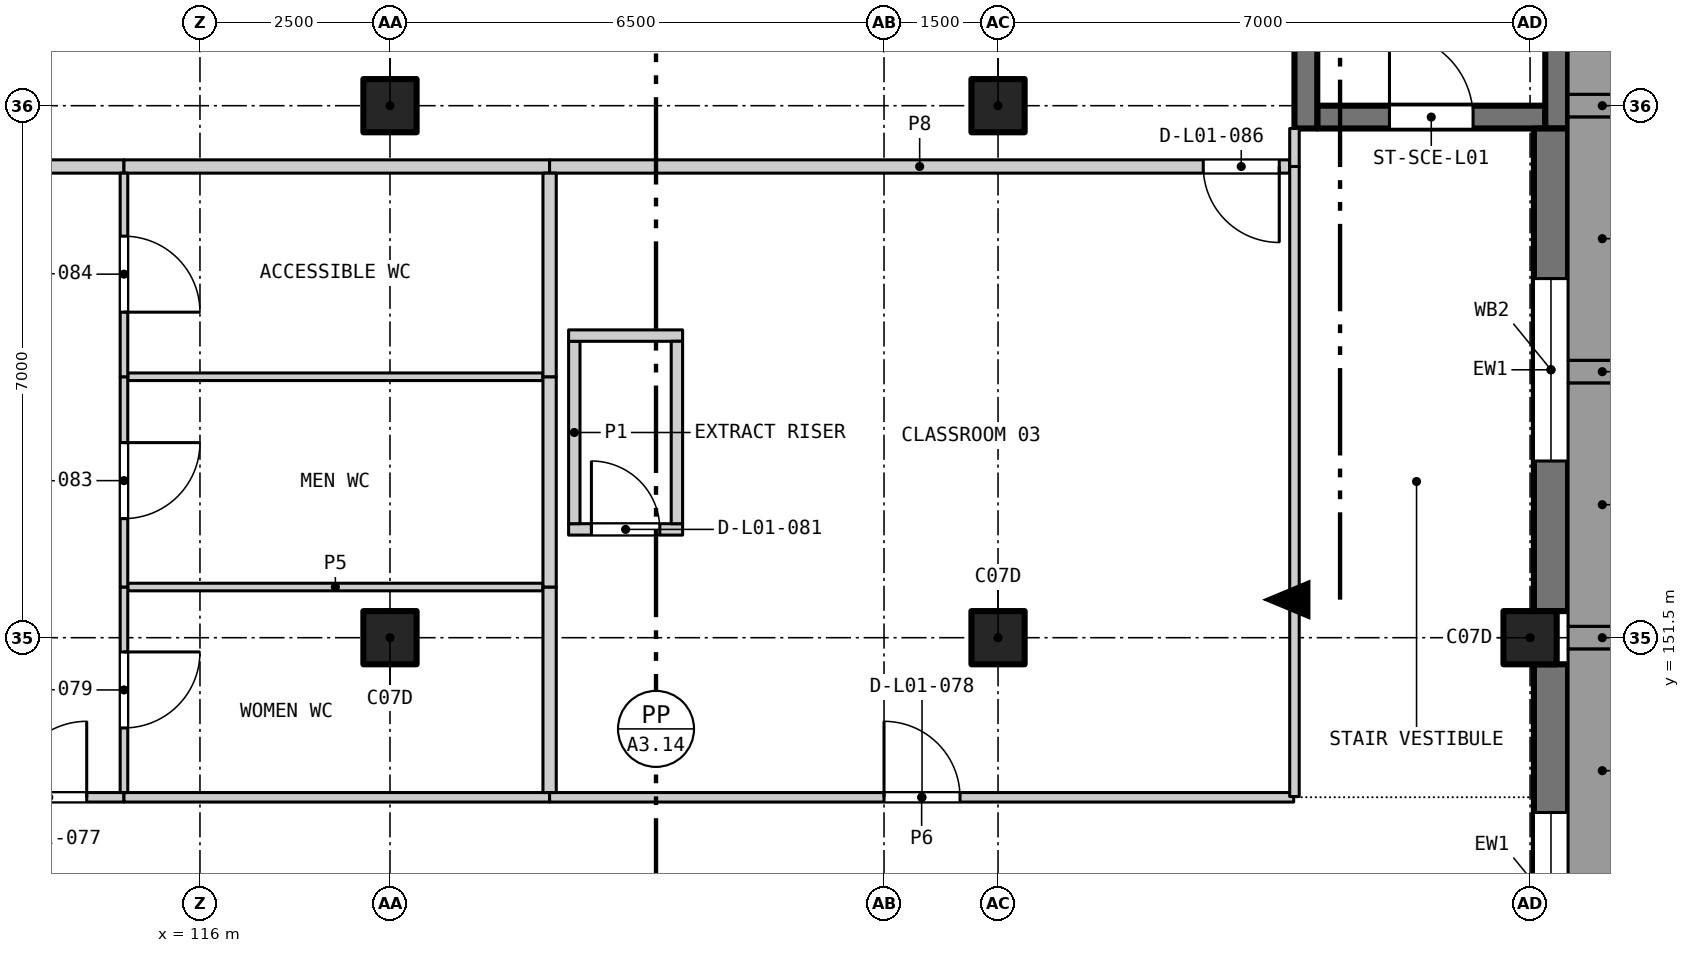
"""IFC4 building model, lengths in metres.
Left out: names, types, materials, properties, quantities, classifications, styles, units other than length and angle.
Written with IfcOpenShell. Run it as: python <this file> out.ifc"""

import sys

from ifc_helpers import new_model, si_unit, direction, frame, frame_2d, origin, origin_2d, place, context, subcontext, project, spatial, rectangle, extrude, element, fill, save


model = new_model("IFC4")
c1 = context("Model", 3, precision=1e-05, world=origin(), true_north=direction((0.0, 1.0)))
c2 = subcontext(c1, "Body", "Model", "MODEL_VIEW")
j1 = project(units=[si_unit("LENGTHUNIT", "METRE"), si_unit("PLANEANGLEUNIT", "RADIAN")], contexts=[c1])
p1 = place(None, origin())
s1 = spatial("IfcSite", under=j1, at=p1, CompositionType="ELEMENT")
p2 = place(p1, origin())
s2 = spatial("IfcBuilding", under=s1, at=p2, CompositionType="ELEMENT")
p3 = place(p2, frame((0.0, 0.0, 6.0)))
s3 = spatial("IfcBuildingStorey", under=s2, at=p3, CompositionType="ELEMENT", Elevation=6.0)
for number, where, z_axis, x_axis in (
    (1, (118.5, 151.5, 0.0), (0.0, 0.0, 1.0), (1.0, 0.0, 0.0)),
    (2, (118.5, 158.5, 0.0), (0.0, 0.0, 1.0), (1.0, 0.0, 0.0)),
    (3, (126.5, 151.5, 0.0), (0.0, 0.0, 1.0), (1.0, 0.0, 0.0)),
    (4, (126.5, 158.5, 0.0), (0.0, 0.0, 1.0), (1.0, 0.0, 0.0)),
    (5, (133.5, 151.5, 0.0), (0.0, 0.0, 1.0), (1.0, 0.0, 0.0)),
):
    element("IfcColumn", number, at=place(p3, frame(where, z_axis=z_axis, x_axis=x_axis)), inside=s3, PredefinedType="COLUMN", context=c2, shape_type="SweptSolid", body=[
        extrude(rectangle(XDim=0.7, YDim=0.7, at=origin_2d()), origin(), (0.0, 0.0, 1.0), 4.2),
    ])
p4 = place(p3, frame((130.7, 158.35, 0.0), z_axis=(0.0, 0.0, 1.0), x_axis=(1.0, 0.0, 0.0)))
e6 = element("IfcWall", 6, at=p4, inside=s3, PredefinedType="SHEAR", context=c2, shape_type="SweptSolid", body=[
    extrude(rectangle(XDim=3.0, YDim=0.3, at=frame_2d((1.5, 0.0))), origin(), (0.0, 0.0, 1.0), 4.2),
])
p5 = place(p4, frame((0.95, 0.0, 0.0)))
e7 = element("IfcOpeningElement", 7, at=p5, cuts=e6, PredefinedType="OPENING", context=c2, shape_type="SweptSolid", body=[
    extrude(rectangle(XDim=1.1, YDim=2.1, at=frame_2d((0.55, 1.05))), frame((0.0, 0.16, 0.0), z_axis=(0.0, -1.0, 0.0), x_axis=(1.0, 0.0, 0.0)), (0.0, 0.0, 1.0), 0.32),
])
p6 = place(p3, frame((130.55, 158.2, 0.0), z_axis=(0.0, 0.0, 1.0), x_axis=(0.0, 1.0, 0.0)))
e8 = element("IfcWall", 8, at=p6, inside=s3, PredefinedType="SHEAR", context=c2, shape_type="SweptSolid", body=[
    extrude(rectangle(XDim=7.5, YDim=0.3, at=frame_2d((3.75, 0.0))), origin(), (0.0, 0.0, 1.0), 4.2),
])
p7 = place(p3, frame((133.85, 165.7, 0.0), z_axis=(0.0, 0.0, 1.0), x_axis=(0.0, -1.0, 0.0)))
e9 = element("IfcWall", 9, at=p7, inside=s3, PredefinedType="SOLIDWALL", context=c2, shape_type="SweptSolid", body=[
    extrude(rectangle(XDim=7.5, YDim=0.3, at=frame_2d((3.75, 0.0))), origin(), (0.0, 0.0, 1.0), 3.9),
])
p8 = place(p3, frame((133.775, 151.15, 0.0), z_axis=(0.0, 0.0, 1.0), x_axis=(0.0, -1.0, 0.0)))
e10 = element("IfcWall", 10, at=p8, inside=s3, PredefinedType="SOLIDWALL", context=c2, shape_type="SweptSolid", body=[
    extrude(rectangle(XDim=6.3, YDim=0.45, at=frame_2d((3.15, 0.0))), origin(), (0.0, 0.0, 1.0), 3.2),
])
p9 = place(p8, frame((1.95, 0.0, 0.9)))
e11 = element("IfcOpeningElement", 11, at=p9, cuts=e10, PredefinedType="OPENING", context=c2, shape_type="SweptSolid", body=[
    extrude(rectangle(XDim=2.4, YDim=1.6, at=frame_2d((1.2, 0.8))), frame((0.0, 0.235, 0.0), z_axis=(0.0, -1.0, 0.0), x_axis=(1.0, 0.0, 0.0)), (0.0, 0.0, 1.0), 0.47),
])
p10 = place(p3, frame((133.775, 158.2, 0.0), z_axis=(0.0, 0.0, 1.0), x_axis=(0.0, -1.0, 0.0)))
e12 = element("IfcWall", 12, at=p10, inside=s3, PredefinedType="SOLIDWALL", context=c2, shape_type="SweptSolid", body=[
    extrude(rectangle(XDim=6.35, YDim=0.45, at=frame_2d((3.175, 0.0))), origin(), (0.0, 0.0, 1.0), 3.2),
])
p11 = place(p10, frame((1.975, 0.0, 0.9)))
e13 = element("IfcOpeningElement", 13, at=p11, cuts=e12, PredefinedType="OPENING", context=c2, shape_type="SweptSolid", body=[
    extrude(rectangle(XDim=2.4, YDim=1.6, at=frame_2d((1.2, 0.8))), frame((0.0, 0.235, 0.0), z_axis=(0.0, -1.0, 0.0), x_axis=(1.0, 0.0, 0.0)), (0.0, 0.0, 1.0), 0.47),
])
p12 = place(p3, frame((120.85, 152.925, 0.0), z_axis=(0.0, 0.0, 1.0), x_axis=(1.0, 0.0, 0.0)))
e14 = element("IfcWall", 14, at=p12, inside=s3, PredefinedType="PARTITIONING", context=c2, shape_type="SweptSolid", body=[
    extrude(rectangle(XDim=1.5, YDim=0.15, at=frame_2d((0.75, 0.0))), origin(), (0.0, 0.0, 1.0), 3.9),
])
p13 = place(p12, frame((0.3, 0.0, 0.0)))
e15 = element("IfcOpeningElement", 15, at=p13, cuts=e14, PredefinedType="OPENING", context=c2, shape_type="SweptSolid", body=[
    extrude(rectangle(XDim=0.9, YDim=2.1, at=frame_2d((0.45, 1.05))), frame((0.0, 0.085, 0.0), z_axis=(0.0, -1.0, 0.0), x_axis=(1.0, 0.0, 0.0)), (0.0, 0.0, 1.0), 0.17),
])
p14 = place(p3, frame((120.925, 153.0, 0.0), z_axis=(0.0, 0.0, 1.0), x_axis=(0.0, 1.0, 0.0)))
e16 = element("IfcWall", 16, at=p14, inside=s3, PredefinedType="PARTITIONING", context=c2, shape_type="SweptSolid", body=[
    extrude(rectangle(XDim=2.4, YDim=0.15, at=frame_2d((1.2, 0.0))), origin(), (0.0, 0.0, 1.0), 3.9),
])
p15 = place(p3, frame((120.85, 155.475, 0.0), z_axis=(0.0, 0.0, 1.0), x_axis=(1.0, 0.0, 0.0)))
e17 = element("IfcWall", 17, at=p15, inside=s3, PredefinedType="PARTITIONING", context=c2, shape_type="SweptSolid", body=[
    extrude(rectangle(XDim=1.5, YDim=0.15, at=frame_2d((0.75, 0.0))), origin(), (0.0, 0.0, 1.0), 3.9),
])
p16 = place(p3, frame((122.275, 153.0, 0.0), z_axis=(0.0, 0.0, 1.0), x_axis=(0.0, 1.0, 0.0)))
e18 = element("IfcWall", 18, at=p16, inside=s3, PredefinedType="PARTITIONING", context=c2, shape_type="SweptSolid", body=[
    extrude(rectangle(XDim=2.4, YDim=0.15, at=frame_2d((1.2, 0.0))), origin(), (0.0, 0.0, 1.0), 3.9),
])
p17 = place(p3, frame((113.01, 149.4, 0.0), z_axis=(0.0, 0.0, 1.0), x_axis=(1.0, 0.0, 0.0)))
e19 = element("IfcWall", 19, at=p17, inside=s3, PredefinedType="PARTITIONING", context=c2, shape_type="SweptSolid", body=[
    extrude(rectangle(XDim=1.99, YDim=0.125, at=frame_2d((0.995, 0.0))), origin(), (0.0, 0.0, 1.0), 3.9),
])
p18 = place(p17, frame((0.5, 0.0, 0.0)))
e20 = element("IfcOpeningElement", 20, at=p18, cuts=e19, PredefinedType="OPENING", context=c2, shape_type="SweptSolid", body=[
    extrude(rectangle(XDim=1.0, YDim=2.1, at=frame_2d((0.5, 1.05))), frame((0.0, 0.073, 0.0), z_axis=(0.0, -1.0, 0.0), x_axis=(1.0, 0.0, 0.0)), (0.0, 0.0, 1.0), 0.145),
])
p19 = place(p3, frame((115.0, 149.4, 0.0), z_axis=(0.0, 0.0, 1.0), x_axis=(1.0, 0.0, 0.0)))
e21 = element("IfcWall", 21, at=p19, inside=s3, PredefinedType="PARTITIONING", context=c2, shape_type="SweptSolid", body=[
    extrude(rectangle(XDim=5.6, YDim=0.125, at=frame_2d((2.8, 0.0))), origin(), (0.0, 0.0, 1.0), 3.9),
])
p20 = place(p3, frame((120.6, 149.4, 0.0), z_axis=(0.0, 0.0, 1.0), x_axis=(1.0, 0.0, 0.0)))
e22 = element("IfcWall", 22, at=p20, inside=s3, PredefinedType="PARTITIONING", context=c2, shape_type="SweptSolid", body=[
    extrude(rectangle(XDim=9.79, YDim=0.125, at=frame_2d((4.895, 0.0))), origin(), (0.0, 0.0, 1.0), 3.9),
])
p21 = place(p20, frame((4.4, 0.0, 0.0)))
e23 = element("IfcOpeningElement", 23, at=p21, cuts=e22, PredefinedType="OPENING", context=c2, shape_type="SweptSolid", body=[
    extrude(rectangle(XDim=1.0, YDim=2.1, at=frame_2d((0.5, 1.05))), frame((0.0, 0.073, 0.0), z_axis=(0.0, -1.0, 0.0), x_axis=(1.0, 0.0, 0.0)), (0.0, 0.0, 1.0), 0.145),
])
for number, where, z_axis, x_axis in (
    (24, (115.05, 152.167, 0.0), (0.0, 0.0, 1.0), (1.0, 0.0, 0.0)),
    (25, (115.05, 154.933, 0.0), (0.0, 0.0, 1.0), (1.0, 0.0, 0.0)),
):
    element("IfcWall", number, at=place(p3, frame(where, z_axis=z_axis, x_axis=x_axis)), inside=s3, PredefinedType="PARTITIONING", context=c2, shape_type="SweptSolid", body=[
        extrude(rectangle(XDim=5.462, YDim=0.1, at=frame_2d((2.731, 0.0))), origin(), (0.0, 0.0, 1.0), 3.9),
    ])
p22 = place(p3, frame((113.062, 157.7, 0.0), z_axis=(0.0, 0.0, 1.0), x_axis=(1.0, 0.0, 0.0)))
e26 = element("IfcWall", 26, at=p22, inside=s3, PredefinedType="PARTITIONING", context=c2, shape_type="SweptSolid", body=[
    extrude(rectangle(XDim=1.938, YDim=0.175, at=frame_2d((0.969, 0.0))), origin(), (0.0, 0.0, 1.0), 3.9),
])
p23 = place(p3, frame((115.0, 157.7, 0.0), z_axis=(0.0, 0.0, 1.0), x_axis=(1.0, 0.0, 0.0)))
e27 = element("IfcWall", 27, at=p23, inside=s3, PredefinedType="PARTITIONING", context=c2, shape_type="SweptSolid", body=[
    extrude(rectangle(XDim=5.6, YDim=0.175, at=frame_2d((2.8, 0.0))), origin(), (0.0, 0.0, 1.0), 3.9),
])
p24 = place(p3, frame((120.6, 157.7, 0.0), z_axis=(0.0, 0.0, 1.0), x_axis=(1.0, 0.0, 0.0)))
e28 = element("IfcWall", 28, at=p24, inside=s3, PredefinedType="PARTITIONING", context=c2, shape_type="SweptSolid", body=[
    extrude(rectangle(XDim=9.737, YDim=0.175, at=frame_2d((4.869, 0.0))), origin(), (0.0, 0.0, 1.0), 3.9),
])
p25 = place(p24, frame((8.6, 0.0, 0.0)))
e29 = element("IfcOpeningElement", 29, at=p25, cuts=e28, PredefinedType="OPENING", context=c2, shape_type="SweptSolid", body=[
    extrude(rectangle(XDim=1.0, YDim=2.1, at=frame_2d((0.5, 1.05))), frame((0.0, 0.097, 0.0), z_axis=(0.0, -1.0, 0.0), x_axis=(1.0, 0.0, 0.0)), (0.0, 0.0, 1.0), 0.195),
])
p26 = place(p3, frame((115.0, 149.462, 0.0), z_axis=(0.0, 0.0, 1.0), x_axis=(0.0, 1.0, 0.0)))
e30 = element("IfcWall", 30, at=p26, inside=s3, PredefinedType="PARTITIONING", context=c2, shape_type="SweptSolid", body=[
    extrude(rectangle(XDim=2.704, YDim=0.1, at=frame_2d((1.352, 0.0))), origin(), (0.0, 0.0, 1.0), 3.9),
])
p27 = place(p26, frame((0.85, 0.0, 0.0)))
e31 = element("IfcOpeningElement", 31, at=p27, cuts=e30, PredefinedType="OPENING", context=c2, shape_type="SweptSolid", body=[
    extrude(rectangle(XDim=1.0, YDim=2.1, at=frame_2d((0.5, 1.05))), frame((0.0, 0.06, 0.0), z_axis=(0.0, -1.0, 0.0), x_axis=(1.0, 0.0, 0.0)), (0.0, 0.0, 1.0), 0.12),
])
p28 = place(p3, frame((115.0, 152.167, 0.0), z_axis=(0.0, 0.0, 1.0), x_axis=(0.0, 1.0, 0.0)))
e32 = element("IfcWall", 32, at=p28, inside=s3, PredefinedType="PARTITIONING", context=c2, shape_type="SweptSolid", body=[
    extrude(rectangle(XDim=2.767, YDim=0.1, at=frame_2d((1.383, 0.0))), origin(), (0.0, 0.0, 1.0), 3.9),
])
p29 = place(p28, frame((0.9, 0.0, 0.0)))
e33 = element("IfcOpeningElement", 33, at=p29, cuts=e32, PredefinedType="OPENING", context=c2, shape_type="SweptSolid", body=[
    extrude(rectangle(XDim=1.0, YDim=2.1, at=frame_2d((0.5, 1.05))), frame((0.0, 0.06, 0.0), z_axis=(0.0, -1.0, 0.0), x_axis=(1.0, 0.0, 0.0)), (0.0, 0.0, 1.0), 0.12),
])
p30 = place(p3, frame((115.0, 154.933, 0.0), z_axis=(0.0, 0.0, 1.0), x_axis=(0.0, 1.0, 0.0)))
e34 = element("IfcWall", 34, at=p30, inside=s3, PredefinedType="PARTITIONING", context=c2, shape_type="SweptSolid", body=[
    extrude(rectangle(XDim=2.679, YDim=0.1, at=frame_2d((1.34, 0.0))), origin(), (0.0, 0.0, 1.0), 3.9),
])
p31 = place(p30, frame((0.85, 0.0, 0.0)))
e35 = element("IfcOpeningElement", 35, at=p31, cuts=e34, PredefinedType="OPENING", context=c2, shape_type="SweptSolid", body=[
    extrude(rectangle(XDim=1.0, YDim=2.1, at=frame_2d((0.5, 1.05))), frame((0.0, 0.06, 0.0), z_axis=(0.0, -1.0, 0.0), x_axis=(1.0, 0.0, 0.0)), (0.0, 0.0, 1.0), 0.12),
])
p32 = place(p3, frame((120.6, 149.462, 0.0), z_axis=(0.0, 0.0, 1.0), x_axis=(0.0, 1.0, 0.0)))
e36 = element("IfcWall", 36, at=p32, inside=s3, PredefinedType="PARTITIONING", context=c2, shape_type="SweptSolid", body=[
    extrude(rectangle(XDim=2.704, YDim=0.175, at=frame_2d((1.352, 0.0))), origin(), (0.0, 0.0, 1.0), 3.9),
])
p33 = place(p3, frame((120.6, 152.167, 0.0), z_axis=(0.0, 0.0, 1.0), x_axis=(0.0, 1.0, 0.0)))
e37 = element("IfcWall", 37, at=p33, inside=s3, PredefinedType="PARTITIONING", context=c2, shape_type="SweptSolid", body=[
    extrude(rectangle(XDim=2.767, YDim=0.175, at=frame_2d((1.383, 0.0))), origin(), (0.0, 0.0, 1.0), 3.9),
])
p34 = place(p3, frame((120.6, 154.933, 0.0), z_axis=(0.0, 0.0, 1.0), x_axis=(0.0, 1.0, 0.0)))
e38 = element("IfcWall", 38, at=p34, inside=s3, PredefinedType="PARTITIONING", context=c2, shape_type="SweptSolid", body=[
    extrude(rectangle(XDim=2.679, YDim=0.175, at=frame_2d((1.34, 0.0))), origin(), (0.0, 0.0, 1.0), 3.9),
])
p35 = place(p3, frame((130.4, 149.41, 0.0), z_axis=(0.0, 0.0, 1.0), x_axis=(0.0, 1.0, 0.0)))
e39 = element("IfcWall", 39, at=p35, inside=s3, PredefinedType="PARTITIONING", context=c2, shape_type="SweptSolid", body=[
    extrude(rectangle(XDim=8.29, YDim=0.125, at=frame_2d((4.145, 0.0))), origin(), (0.0, 0.0, 1.0), 3.9),
])
p36 = place(p3, frame((130.4, 157.7, 0.0), z_axis=(0.0, 0.0, 1.0), x_axis=(0.0, 1.0, 0.0)))
e40 = element("IfcWall", 40, at=p36, inside=s3, PredefinedType="PARTITIONING", context=c2, shape_type="SweptSolid", body=[
    extrude(rectangle(XDim=0.5, YDim=0.125, at=frame_2d((0.25, 0.0))), origin(), (0.0, 0.0, 1.0), 3.9),
])
p37 = place(p9, origin())
e41 = element("IfcWindow", 41, at=p37, inside=s3, PartitioningType="SINGLE_PANEL", PredefinedType="WINDOW", context=c2, shape_type="SweptSolid", body=[
    extrude(rectangle(XDim=2.4, YDim=1.6, at=frame_2d((1.2, 0.8))), frame((0.0, -0.125, 0.0), z_axis=(0.0, -1.0, 0.0), x_axis=(1.0, 0.0, 0.0)), (0.0, 0.0, 1.0), 0.06),
])
fill(e11, e41)
p38 = place(p11, origin())
e42 = element("IfcWindow", 42, at=p38, inside=s3, PartitioningType="SINGLE_PANEL", PredefinedType="WINDOW", context=c2, shape_type="SweptSolid", body=[
    extrude(rectangle(XDim=2.4, YDim=1.6, at=frame_2d((1.2, 0.8))), frame((0.0, -0.125, 0.0), z_axis=(0.0, -1.0, 0.0), x_axis=(1.0, 0.0, 0.0)), (0.0, 0.0, 1.0), 0.06),
])
fill(e13, e42)
p39 = place(p18, origin())
e43 = element("IfcDoor", 43, at=p39, inside=s3, OperationType="SINGLE_SWING_RIGHT", PredefinedType="DOOR", context=c2, shape_type="SweptSolid", body=[
    extrude(rectangle(XDim=1.0, YDim=2.1, at=frame_2d((0.5, 1.05))), frame((0.0, 0.025, 0.0), z_axis=(0.0, -1.0, 0.0), x_axis=(1.0, 0.0, 0.0)), (0.0, 0.0, 1.0), 0.05),
])
fill(e20, e43)
p40 = place(p21, origin())
e44 = element("IfcDoor", 44, at=p40, inside=s3, OperationType="SINGLE_SWING_LEFT", PredefinedType="DOOR", context=c2, shape_type="SweptSolid", body=[
    extrude(rectangle(XDim=1.0, YDim=2.1, at=frame_2d((0.5, 1.05))), frame((0.0, 0.025, 0.0), z_axis=(0.0, -1.0, 0.0), x_axis=(1.0, 0.0, 0.0)), (0.0, 0.0, 1.0), 0.05),
])
fill(e23, e44)
p41 = place(p27, frame((1.0, 0.0, 0.0), z_axis=(0.0, 0.0, 1.0), x_axis=(-1.0, 0.0, 0.0)))
e45 = element("IfcDoor", 45, at=p41, inside=s3, OperationType="SINGLE_SWING_LEFT", PredefinedType="DOOR", context=c2, shape_type="SweptSolid", body=[
    extrude(rectangle(XDim=1.0, YDim=2.1, at=frame_2d((0.5, 1.05))), frame((0.0, 0.025, 0.0), z_axis=(0.0, -1.0, 0.0), x_axis=(1.0, 0.0, 0.0)), (0.0, 0.0, 1.0), 0.05),
])
fill(e31, e45)
p42 = place(p13, origin())
e46 = element("IfcDoor", 46, at=p42, inside=s3, OperationType="SINGLE_SWING_LEFT", PredefinedType="DOOR", context=c2, shape_type="SweptSolid", body=[
    extrude(rectangle(XDim=0.9, YDim=2.1, at=frame_2d((0.45, 1.05))), frame((0.0, 0.025, 0.0), z_axis=(0.0, -1.0, 0.0), x_axis=(1.0, 0.0, 0.0)), (0.0, 0.0, 1.0), 0.05),
])
fill(e15, e46)
p43 = place(p29, frame((1.0, 0.0, 0.0), z_axis=(0.0, 0.0, 1.0), x_axis=(-1.0, 0.0, 0.0)))
e47 = element("IfcDoor", 47, at=p43, inside=s3, OperationType="SINGLE_SWING_LEFT", PredefinedType="DOOR", context=c2, shape_type="SweptSolid", body=[
    extrude(rectangle(XDim=1.0, YDim=2.1, at=frame_2d((0.5, 1.05))), frame((0.0, 0.025, 0.0), z_axis=(0.0, -1.0, 0.0), x_axis=(1.0, 0.0, 0.0)), (0.0, 0.0, 1.0), 0.05),
])
fill(e33, e47)
p44 = place(p31, frame((1.0, 0.0, 0.0), z_axis=(0.0, 0.0, 1.0), x_axis=(-1.0, 0.0, 0.0)))
e48 = element("IfcDoor", 48, at=p44, inside=s3, OperationType="SINGLE_SWING_RIGHT", PredefinedType="DOOR", context=c2, shape_type="SweptSolid", body=[
    extrude(rectangle(XDim=1.0, YDim=2.1, at=frame_2d((0.5, 1.05))), frame((0.0, 0.025, 0.0), z_axis=(0.0, -1.0, 0.0), x_axis=(1.0, 0.0, 0.0)), (0.0, 0.0, 1.0), 0.05),
])
fill(e35, e48)
p45 = place(p25, frame((1.0, 0.0, 0.0), z_axis=(0.0, 0.0, 1.0), x_axis=(-1.0, 0.0, 0.0)))
e49 = element("IfcDoor", 49, at=p45, inside=s3, OperationType="SINGLE_SWING_LEFT", PredefinedType="DOOR", context=c2, shape_type="SweptSolid", body=[
    extrude(rectangle(XDim=1.0, YDim=2.1, at=frame_2d((0.5, 1.05))), frame((0.0, 0.025, 0.0), z_axis=(0.0, -1.0, 0.0), x_axis=(1.0, 0.0, 0.0)), (0.0, 0.0, 1.0), 0.05),
])
fill(e29, e49)
p46 = place(p5, origin())
e50 = element("IfcDoor", 50, at=p46, inside=s3, OperationType="SINGLE_SWING_LEFT", PredefinedType="DOOR", context=c2, shape_type="SweptSolid", body=[
    extrude(rectangle(XDim=1.1, YDim=2.1, at=frame_2d((0.55, 1.05))), frame((0.0, 0.025, 0.0), z_axis=(0.0, -1.0, 0.0), x_axis=(1.0, 0.0, 0.0)), (0.0, 0.0, 1.0), 0.05),
])
fill(e7, e50)
save(model, sys.argv[1])
